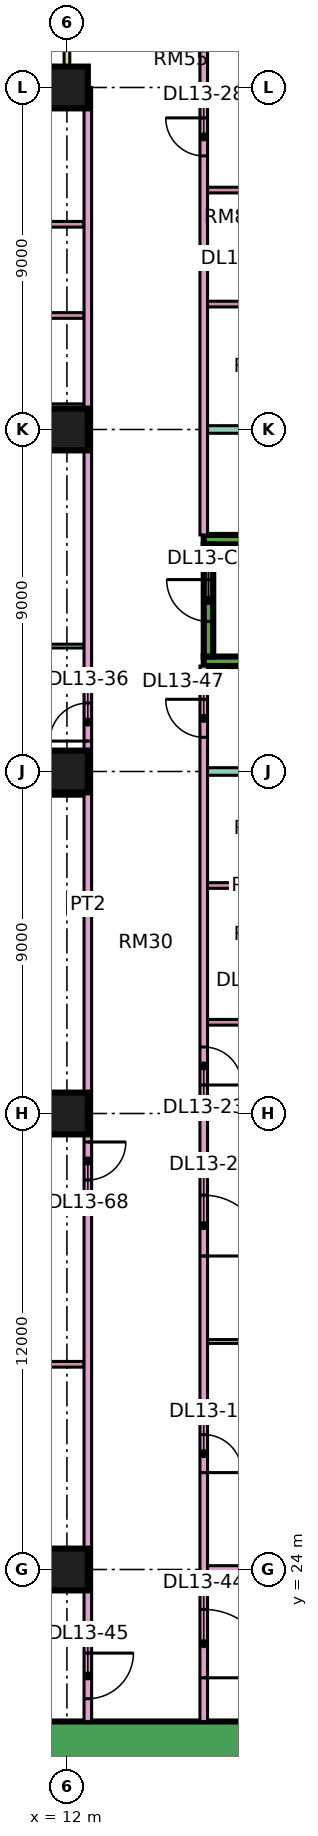
"""IFC4 building model, lengths in metres.
Left out: names, types, materials, properties, quantities, classifications, styles, units other than length and angle.
Written with IfcOpenShell. Run it as: python <this file> out.ifc"""

import sys

from ifc_helpers import new_model, si_unit, direction, frame, frame_2d, origin, origin_2d, place, context, subcontext, project, spatial, rectangle, extrude, element, fill, save


model = new_model("IFC4")
c1 = context("Model", 3, precision=1e-05, world=origin(), true_north=direction((0.0, 1.0)))
c2 = subcontext(c1, "Body", "Model", "MODEL_VIEW")
j1 = project(units=[si_unit("LENGTHUNIT", "METRE"), si_unit("PLANEANGLEUNIT", "RADIAN")], contexts=[c1])
p1 = place(None, origin())
s1 = spatial("IfcSite", under=j1, at=p1, CompositionType="ELEMENT")
p2 = place(p1, origin())
s2 = spatial("IfcBuilding", under=s1, at=p2, CompositionType="ELEMENT")
p3 = place(p2, frame((0.0, 0.0, 63.9)))
s3 = spatial("IfcBuildingStorey", under=s2, at=p3, CompositionType="ELEMENT", Elevation=63.9)
for number, where, z_axis, x_axis in (
    (1, (12.0, 24.0, 0.0), (0.0, 0.0, 1.0), (1.0, 0.0, 0.0)),
    (2, (12.0, 36.0, 0.0), (0.0, 0.0, 1.0), (1.0, 0.0, 0.0)),
    (3, (12.0, 45.0, 0.0), (0.0, 0.0, 1.0), (1.0, 0.0, 0.0)),
    (4, (12.0, 54.0, 0.0), (0.0, 0.0, 1.0), (1.0, 0.0, 0.0)),
    (5, (12.0, 63.0, 0.0), (0.0, 0.0, 1.0), (1.0, 0.0, 0.0)),
):
    element("IfcColumn", number, at=place(p3, frame(where, z_axis=z_axis, x_axis=x_axis)), inside=s3, PredefinedType="COLUMN", context=c2, shape_type="SweptSolid", body=[
        extrude(rectangle(XDim=1.1, YDim=1.1, at=origin_2d()), origin(), (0.0, 0.0, 1.0), 3.75),
    ])
p4 = place(p3, frame((9.0, 19.45, 0.0), z_axis=(0.0, 0.0, 1.0), x_axis=(1.0, 0.0, 0.0)))
e6 = element("IfcWall", 6, at=p4, inside=s3, PredefinedType="SHEAR", context=c2, shape_type="SweptSolid", body=[
    extrude(rectangle(XDim=25.0, YDim=1.1, at=frame_2d((12.5, 0.0))), origin(), (0.0, 0.0, 1.0), 3.75),
])
p5 = place(p4, frame((19.1, 0.0, 0.0)))
e7 = element("IfcOpeningElement", 7, at=p5, cuts=e6, PredefinedType="OPENING", context=c2, shape_type="SweptSolid", body=[
    extrude(rectangle(XDim=1.8, YDim=2.4, at=frame_2d((0.9, 1.2))), frame((0.0, 0.56, 0.0), z_axis=(0.0, -1.0, 0.0), x_axis=(1.0, 0.0, 0.0)), (0.0, 0.0, 1.0), 1.12),
])
for number, where, z_axis, x_axis in (
    (8, (15.6, 47.9, 0.0), (0.0, 0.0, 1.0), (1.0, 0.0, 0.0)),
    (9, (15.6, 51.1, 0.0), (0.0, 0.0, 1.0), (1.0, 0.0, 0.0)),
):
    element("IfcWall", number, at=place(p3, frame(where, z_axis=z_axis, x_axis=x_axis)), inside=s3, PredefinedType="SHEAR", context=c2, shape_type="SweptSolid", body=[
        extrude(rectangle(XDim=7.0, YDim=0.25, at=frame_2d((3.5, 0.0))), origin(), (0.0, 0.0, 1.0), 3.75),
    ])
p6 = place(p3, frame((15.725, 48.025, 0.0), z_axis=(0.0, 0.0, 1.0), x_axis=(0.0, 1.0, 0.0)))
e10 = element("IfcWall", 10, at=p6, inside=s3, PredefinedType="SHEAR", context=c2, shape_type="SweptSolid", body=[
    extrude(rectangle(XDim=2.95, YDim=0.25, at=frame_2d((1.475, 0.0))), origin(), (0.0, 0.0, 1.0), 3.75),
])
p7 = place(p6, frame((0.925, 0.0, 0.0)))
e11 = element("IfcOpeningElement", 11, at=p7, cuts=e10, PredefinedType="OPENING", context=c2, shape_type="SweptSolid", body=[
    extrude(rectangle(XDim=1.1, YDim=2.2, at=frame_2d((0.55, 1.1))), frame((0.0, 0.135, 0.0), z_axis=(0.0, -1.0, 0.0), x_axis=(1.0, 0.0, 0.0)), (0.0, 0.0, 1.0), 0.27),
])
p8 = place(p3, frame((11.925, 63.0, 0.0), z_axis=(0.0, 0.0, 1.0), x_axis=(-1.0, 0.0, 0.0)))
e12 = element("IfcWall", 12, at=p8, inside=s3, PredefinedType="SOLIDWALL", context=c2, shape_type="SweptSolid", body=[
    extrude(rectangle(XDim=10.35, YDim=0.15, at=frame_2d((5.175, 0.0))), origin(), (0.0, 0.0, 1.0), 3.35),
])
p9 = place(p8, frame((2.075, 0.0, 1.7)))
e13 = element("IfcOpeningElement", 13, at=p9, cuts=e12, PredefinedType="OPENING", context=c2, shape_type="SweptSolid", body=[
    extrude(rectangle(XDim=1.2, YDim=0.9, at=frame_2d((0.6, 0.45))), frame((0.0, 0.085, 0.0), z_axis=(0.0, -1.0, 0.0), x_axis=(1.0, 0.0, 0.0)), (0.0, 0.0, 1.0), 0.17),
])
p10 = place(p8, frame((7.262, 0.0, 0.0)))
e14 = element("IfcOpeningElement", 14, at=p10, cuts=e12, PredefinedType="OPENING", context=c2, shape_type="SweptSolid", body=[
    extrude(rectangle(XDim=1.8, YDim=2.4, at=frame_2d((0.9, 1.2))), frame((0.0, 0.085, 0.0), z_axis=(0.0, -1.0, 0.0), x_axis=(1.0, 0.0, 0.0)), (0.0, 0.0, 1.0), 0.17),
])
p11 = place(p3, frame((12.0, 64.5, 0.0), z_axis=(0.0, 0.0, 1.0), x_axis=(0.0, -1.0, 0.0)))
e15 = element("IfcWall", 15, at=p11, inside=s3, PredefinedType="SOLIDWALL", context=c2, shape_type="SweptSolid", body=[
    extrude(rectangle(XDim=1.5, YDim=0.15, at=frame_2d((0.75, 0.0))), origin(), (0.0, 0.0, 1.0), 3.35),
])
p12 = place(p3, frame((-1.35, 22.4, 0.0), z_axis=(0.0, 0.0, 1.0), x_axis=(1.0, 0.0, 0.0)))
e16 = element("IfcWall", 16, at=p12, inside=s3, PredefinedType="PARTITIONING", context=c2, shape_type="SweptSolid", body=[
    extrude(rectangle(XDim=13.8, YDim=0.2, at=frame_2d((6.9, 0.0))), origin(), (0.0, 0.0, 1.0), 3.35),
])
p13 = place(p3, frame((0.0, 36.0, 0.0), z_axis=(0.0, 0.0, 1.0), x_axis=(1.0, 0.0, 0.0)))
e17 = element("IfcWall", 17, at=p13, inside=s3, PredefinedType="PARTITIONING", context=c2, shape_type="SweptSolid", body=[
    extrude(rectangle(XDim=12.45, YDim=0.2, at=frame_2d((6.225, 0.0))), origin(), (0.0, 0.0, 1.0), 3.35),
])
p14 = place(p3, frame((7.2, 44.4, 0.0), z_axis=(0.0, 0.0, 1.0), x_axis=(1.0, 0.0, 0.0)))
e18 = element("IfcWall", 18, at=p14, inside=s3, PredefinedType="PARTITIONING", context=c2, shape_type="SweptSolid", body=[
    extrude(rectangle(XDim=5.25, YDim=0.1, at=frame_2d((2.625, 0.0))), origin(), (0.0, 0.0, 1.0), 3.35),
])
p15 = place(p3, frame((7.225, 29.4, 0.0), z_axis=(0.0, 0.0, 1.0), x_axis=(1.0, 0.0, 0.0)))
e19 = element("IfcWall", 19, at=p15, inside=s3, PredefinedType="PARTITIONING", context=c2, shape_type="SweptSolid", body=[
    extrude(rectangle(XDim=5.225, YDim=0.15, at=frame_2d((2.612, 0.0))), origin(), (0.0, 0.0, 1.0), 3.35),
])
p16 = place(p3, frame((7.225, 33.6, 0.0), z_axis=(0.0, 0.0, 1.0), x_axis=(1.0, 0.0, 0.0)))
e20 = element("IfcWall", 20, at=p16, inside=s3, PredefinedType="PARTITIONING", context=c2, shape_type="SweptSolid", body=[
    extrude(rectangle(XDim=5.225, YDim=0.15, at=frame_2d((2.612, 0.0))), origin(), (0.0, 0.0, 1.0), 3.35),
])
p17 = place(p16, frame((2.175, 0.0, 0.0)))
e21 = element("IfcOpeningElement", 21, at=p17, cuts=e20, PredefinedType="OPENING", context=c2, shape_type="SweptSolid", body=[
    extrude(rectangle(XDim=0.8, YDim=2.1, at=frame_2d((0.4, 1.05))), frame((0.0, 0.085, 0.0), z_axis=(0.0, -1.0, 0.0), x_axis=(1.0, 0.0, 0.0)), (0.0, 0.0, 1.0), 0.17),
])
p18 = place(p3, frame((7.225, 48.3, 0.0), z_axis=(0.0, 0.0, 1.0), x_axis=(1.0, 0.0, 0.0)))
e22 = element("IfcWall", 22, at=p18, inside=s3, PredefinedType="PARTITIONING", context=c2, shape_type="SweptSolid", body=[
    extrude(rectangle(XDim=5.225, YDim=0.1, at=frame_2d((2.612, 0.0))), origin(), (0.0, 0.0, 1.0), 3.35),
])
p19 = place(p18, frame((2.175, 0.0, 0.0)))
e23 = element("IfcOpeningElement", 23, at=p19, cuts=e22, PredefinedType="OPENING", context=c2, shape_type="SweptSolid", body=[
    extrude(rectangle(XDim=0.9, YDim=2.1, at=frame_2d((0.45, 1.05))), frame((0.0, 0.06, 0.0), z_axis=(0.0, -1.0, 0.0), x_axis=(1.0, 0.0, 0.0)), (0.0, 0.0, 1.0), 0.12),
])
for number, where, z_axis, x_axis in (
    (24, (7.225, 54.6, 0.0), (0.0, 0.0, 1.0), (1.0, 0.0, 0.0)),
    (25, (7.225, 57.0, 0.0), (0.0, 0.0, 1.0), (1.0, 0.0, 0.0)),
    (26, (7.225, 59.4, 0.0), (0.0, 0.0, 1.0), (1.0, 0.0, 0.0)),
):
    element("IfcWall", number, at=place(p3, frame(where, z_axis=z_axis, x_axis=x_axis)), inside=s3, PredefinedType="PARTITIONING", context=c2, shape_type="SweptSolid", body=[
        extrude(rectangle(XDim=5.225, YDim=0.15, at=frame_2d((2.612, 0.0))), origin(), (0.0, 0.0, 1.0), 3.35),
    ])
p20 = place(p3, frame((12.55, 20.0, 0.0), z_axis=(0.0, 0.0, 1.0), x_axis=(0.0, 1.0, 0.0)))
e27 = element("IfcWall", 27, at=p20, inside=s3, PredefinedType="PARTITIONING", context=c2, shape_type="SweptSolid", body=[
    extrude(rectangle(XDim=43.0, YDim=0.2, at=frame_2d((21.5, 0.0))), origin(), (0.0, 0.0, 1.0), 3.35),
])
p21 = place(p20, frame((25.8, 0.0, 0.0)))
e28 = element("IfcOpeningElement", 28, at=p21, cuts=e27, PredefinedType="OPENING", context=c2, shape_type="SweptSolid", body=[
    extrude(rectangle(XDim=1.0, YDim=2.1, at=frame_2d((0.5, 1.05))), frame((0.0, 0.11, 0.0), z_axis=(0.0, -1.0, 0.0), x_axis=(1.0, 0.0, 0.0)), (0.0, 0.0, 1.0), 0.22),
])
p22 = place(p20, frame((0.6, 0.0, 0.0)))
e29 = element("IfcOpeningElement", 29, at=p22, cuts=e27, PredefinedType="OPENING", context=c2, shape_type="SweptSolid", body=[
    extrude(rectangle(XDim=1.2, YDim=2.1, at=frame_2d((0.6, 1.05))), frame((0.0, 0.11, 0.0), z_axis=(0.0, -1.0, 0.0), x_axis=(1.0, 0.0, 0.0)), (0.0, 0.0, 1.0), 0.22),
])
p23 = place(p20, frame((14.25, 0.0, 0.0)))
e30 = element("IfcOpeningElement", 30, at=p23, cuts=e27, PredefinedType="OPENING", context=c2, shape_type="SweptSolid", body=[
    extrude(rectangle(XDim=1.0, YDim=2.1, at=frame_2d((0.5, 1.05))), frame((0.0, 0.11, 0.0), z_axis=(0.0, -1.0, 0.0), x_axis=(1.0, 0.0, 0.0)), (0.0, 0.0, 1.0), 0.22),
])
p24 = place(p3, frame((15.6, 20.0, 0.0), z_axis=(0.0, 0.0, 1.0), x_axis=(0.0, 1.0, 0.0)))
e31 = element("IfcWall", 31, at=p24, inside=s3, PredefinedType="PARTITIONING", context=c2, shape_type="SweptSolid", body=[
    extrude(rectangle(XDim=27.775, YDim=0.2, at=frame_2d((13.887, 0.0))), origin(), (0.0, 0.0, 1.0), 3.35),
])
p25 = place(p24, frame((6.55, 0.0, 0.0)))
e32 = element("IfcOpeningElement", 32, at=p25, cuts=e31, PredefinedType="OPENING", context=c2, shape_type="SweptSolid", body=[
    extrude(rectangle(XDim=1.0, YDim=2.1, at=frame_2d((0.5, 1.05))), frame((0.0, 0.11, 0.0), z_axis=(0.0, -1.0, 0.0), x_axis=(1.0, 0.0, 0.0)), (0.0, 0.0, 1.0), 0.22),
])
p26 = place(p24, frame((12.25, 0.0, 0.0)))
e33 = element("IfcOpeningElement", 33, at=p26, cuts=e31, PredefinedType="OPENING", context=c2, shape_type="SweptSolid", body=[
    extrude(rectangle(XDim=1.6, YDim=2.1, at=frame_2d((0.8, 1.05))), frame((0.0, 0.11, 0.0), z_axis=(0.0, -1.0, 0.0), x_axis=(1.0, 0.0, 0.0)), (0.0, 0.0, 1.0), 0.22),
])
p27 = place(p24, frame((16.75, 0.0, 0.0)))
e34 = element("IfcOpeningElement", 34, at=p27, cuts=e31, PredefinedType="OPENING", context=c2, shape_type="SweptSolid", body=[
    extrude(rectangle(XDim=1.0, YDim=2.1, at=frame_2d((0.5, 1.05))), frame((0.0, 0.11, 0.0), z_axis=(0.0, -1.0, 0.0), x_axis=(1.0, 0.0, 0.0)), (0.0, 0.0, 1.0), 0.22),
])
p28 = place(p24, frame((1.15, 0.0, 0.0)))
e35 = element("IfcOpeningElement", 35, at=p28, cuts=e31, PredefinedType="OPENING", context=c2, shape_type="SweptSolid", body=[
    extrude(rectangle(XDim=1.8, YDim=2.1, at=frame_2d((0.9, 1.05))), frame((0.0, 0.11, 0.0), z_axis=(0.0, -1.0, 0.0), x_axis=(1.0, 0.0, 0.0)), (0.0, 0.0, 1.0), 0.22),
])
p29 = place(p24, frame((25.9, 0.0, 0.0)))
e36 = element("IfcOpeningElement", 36, at=p29, cuts=e31, PredefinedType="OPENING", context=c2, shape_type="SweptSolid", body=[
    extrude(rectangle(XDim=1.0, YDim=2.1, at=frame_2d((0.5, 1.05))), frame((0.0, 0.11, 0.0), z_axis=(0.0, -1.0, 0.0), x_axis=(1.0, 0.0, 0.0)), (0.0, 0.0, 1.0), 0.22),
])
p30 = place(p3, frame((15.6, 51.225, 0.0), z_axis=(0.0, 0.0, 1.0), x_axis=(0.0, 1.0, 0.0)))
e37 = element("IfcWall", 37, at=p30, inside=s3, PredefinedType="PARTITIONING", context=c2, shape_type="SweptSolid", body=[
    extrude(rectangle(XDim=13.125, YDim=0.2, at=frame_2d((6.562, 0.0))), origin(), (0.0, 0.0, 1.0), 3.35),
])
p31 = place(p30, frame((9.975, 0.0, 0.0)))
e38 = element("IfcOpeningElement", 38, at=p31, cuts=e37, PredefinedType="OPENING", context=c2, shape_type="SweptSolid", body=[
    extrude(rectangle(XDim=1.0, YDim=2.1, at=frame_2d((0.5, 1.05))), frame((0.0, 0.11, 0.0), z_axis=(0.0, -1.0, 0.0), x_axis=(1.0, 0.0, 0.0)), (0.0, 0.0, 1.0), 0.22),
])
p32 = place(p3, frame((15.7, 24.0, 0.0), z_axis=(0.0, 0.0, 1.0), x_axis=(1.0, 0.0, 0.0)))
e39 = element("IfcWall", 39, at=p32, inside=s3, PredefinedType="PARTITIONING", context=c2, shape_type="SweptSolid", body=[
    extrude(rectangle(XDim=5.8, YDim=0.2, at=frame_2d((2.9, 0.0))), origin(), (0.0, 0.0, 1.0), 3.35),
])
p33 = place(p3, frame((15.7, 30.0, 0.0), z_axis=(0.0, 0.0, 1.0), x_axis=(1.0, 0.0, 0.0)))
e40 = element("IfcWall", 40, at=p33, inside=s3, PredefinedType="PARTITIONING", context=c2, shape_type="SweptSolid", body=[
    extrude(rectangle(XDim=5.8, YDim=0.1, at=frame_2d((2.9, 0.0))), origin(), (0.0, 0.0, 1.0), 3.35),
])
p34 = place(p3, frame((15.7, 36.0, 0.0), z_axis=(0.0, 0.0, 1.0), x_axis=(1.0, 0.0, 0.0)))
e41 = element("IfcWall", 41, at=p34, inside=s3, PredefinedType="PARTITIONING", context=c2, shape_type="SweptSolid", body=[
    extrude(rectangle(XDim=8.3, YDim=0.2, at=frame_2d((4.15, 0.0))), origin(), (0.0, 0.0, 1.0), 3.35),
])
p35 = place(p3, frame((15.7, 38.4, 0.0), z_axis=(0.0, 0.0, 1.0), x_axis=(1.0, 0.0, 0.0)))
e42 = element("IfcWall", 42, at=p35, inside=s3, PredefinedType="PARTITIONING", context=c2, shape_type="SweptSolid", body=[
    extrude(rectangle(XDim=2.525, YDim=0.15, at=frame_2d((1.263, 0.0))), origin(), (0.0, 0.0, 1.0), 3.35),
])
p36 = place(p35, frame((0.9, 0.0, 0.0)))
e43 = element("IfcOpeningElement", 43, at=p36, cuts=e42, PredefinedType="OPENING", context=c2, shape_type="SweptSolid", body=[
    extrude(rectangle(XDim=0.8, YDim=2.1, at=frame_2d((0.4, 1.05))), frame((0.0, 0.085, 0.0), z_axis=(0.0, -1.0, 0.0), x_axis=(1.0, 0.0, 0.0)), (0.0, 0.0, 1.0), 0.17),
])
p37 = place(p3, frame((15.7, 42.0, 0.0), z_axis=(0.0, 0.0, 1.0), x_axis=(1.0, 0.0, 0.0)))
e44 = element("IfcWall", 44, at=p37, inside=s3, PredefinedType="PARTITIONING", context=c2, shape_type="SweptSolid", body=[
    extrude(rectangle(XDim=2.525, YDim=0.15, at=frame_2d((1.263, 0.0))), origin(), (0.0, 0.0, 1.0), 3.35),
])
p38 = place(p3, frame((15.7, 45.0, 0.0), z_axis=(0.0, 0.0, 1.0), x_axis=(1.0, 0.0, 0.0)))
e45 = element("IfcWall", 45, at=p38, inside=s3, PredefinedType="PARTITIONING", context=c2, shape_type="SweptSolid", body=[
    extrude(rectangle(XDim=8.3, YDim=0.2, at=frame_2d((4.15, 0.0))), origin(), (0.0, 0.0, 1.0), 3.35),
])
p39 = place(p3, frame((15.7, 54.0, 0.0), z_axis=(0.0, 0.0, 1.0), x_axis=(1.0, 0.0, 0.0)))
e46 = element("IfcWall", 46, at=p39, inside=s3, PredefinedType="PARTITIONING", context=c2, shape_type="SweptSolid", body=[
    extrude(rectangle(XDim=8.226, YDim=0.2, at=frame_2d((4.113, 0.0))), origin(), (0.0, 0.0, 1.0), 3.35),
])
for number, where, z_axis, x_axis in (
    (47, (15.7, 57.3, 0.0), (0.0, 0.0, 1.0), (1.0, 0.0, 0.0)),
    (48, (15.7, 60.3, 0.0), (0.0, 0.0, 1.0), (1.0, 0.0, 0.0)),
):
    element("IfcWall", number, at=place(p3, frame(where, z_axis=z_axis, x_axis=x_axis)), inside=s3, PredefinedType="PARTITIONING", context=c2, shape_type="SweptSolid", body=[
        extrude(rectangle(XDim=2.525, YDim=0.15, at=frame_2d((1.263, 0.0))), origin(), (0.0, 0.0, 1.0), 3.35),
    ])
p40 = place(p7, frame((1.1, 0.0, 0.0), z_axis=(0.0, 0.0, 1.0), x_axis=(-1.0, 0.0, 0.0)))
e49 = element("IfcDoor", 49, at=p40, inside=s3, OperationType="SINGLE_SWING_RIGHT", PredefinedType="DOOR", context=c2, shape_type="SweptSolid", body=[
    extrude(rectangle(XDim=1.1, YDim=2.2, at=frame_2d((0.55, 1.1))), frame((0.0, 0.025, 0.0), z_axis=(0.0, -1.0, 0.0), x_axis=(1.0, 0.0, 0.0)), (0.0, 0.0, 1.0), 0.05),
])
fill(e11, e49)
p41 = place(p25, frame((1.0, 0.0, 0.0), z_axis=(0.0, 0.0, 1.0), x_axis=(-1.0, 0.0, 0.0)))
e50 = element("IfcDoor", 50, at=p41, inside=s3, OperationType="SINGLE_SWING_LEFT", PredefinedType="DOOR", context=c2, shape_type="SweptSolid", body=[
    extrude(rectangle(XDim=1.0, YDim=2.1, at=frame_2d((0.5, 1.05))), frame((0.0, 0.025, 0.0), z_axis=(0.0, -1.0, 0.0), x_axis=(1.0, 0.0, 0.0)), (0.0, 0.0, 1.0), 0.05),
])
fill(e32, e50)
p42 = place(p26, frame((1.6, 0.0, 0.0), z_axis=(0.0, 0.0, 1.0), x_axis=(-1.0, 0.0, 0.0)))
e51 = element("IfcDoor", 51, at=p42, inside=s3, OperationType="DOUBLE_DOOR_SINGLE_SWING", PredefinedType="DOOR", context=c2, shape_type="SweptSolid", body=[
    extrude(rectangle(XDim=1.6, YDim=2.1, at=frame_2d((0.8, 1.05))), frame((0.0, 0.025, 0.0), z_axis=(0.0, -1.0, 0.0), x_axis=(1.0, 0.0, 0.0)), (0.0, 0.0, 1.0), 0.05),
])
fill(e33, e51)
p43 = place(p27, frame((1.0, 0.0, 0.0), z_axis=(0.0, 0.0, 1.0), x_axis=(-1.0, 0.0, 0.0)))
e52 = element("IfcDoor", 52, at=p43, inside=s3, OperationType="SINGLE_SWING_LEFT", PredefinedType="DOOR", context=c2, shape_type="SweptSolid", body=[
    extrude(rectangle(XDim=1.0, YDim=2.1, at=frame_2d((0.5, 1.05))), frame((0.0, 0.025, 0.0), z_axis=(0.0, -1.0, 0.0), x_axis=(1.0, 0.0, 0.0)), (0.0, 0.0, 1.0), 0.05),
])
fill(e34, e52)
p44 = place(p31, frame((1.0, 0.0, 0.0), z_axis=(0.0, 0.0, 1.0), x_axis=(-1.0, 0.0, 0.0)))
e53 = element("IfcDoor", 53, at=p44, inside=s3, OperationType="SINGLE_SWING_RIGHT", PredefinedType="DOOR", context=c2, shape_type="SweptSolid", body=[
    extrude(rectangle(XDim=1.0, YDim=2.1, at=frame_2d((0.5, 1.05))), frame((0.0, 0.025, 0.0), z_axis=(0.0, -1.0, 0.0), x_axis=(1.0, 0.0, 0.0)), (0.0, 0.0, 1.0), 0.05),
])
fill(e38, e53)
p45 = place(p21, origin())
e54 = element("IfcDoor", 54, at=p45, inside=s3, OperationType="SINGLE_SWING_LEFT", PredefinedType="DOOR", context=c2, shape_type="SweptSolid", body=[
    extrude(rectangle(XDim=1.0, YDim=2.1, at=frame_2d((0.5, 1.05))), frame((0.0, 0.025, 0.0), z_axis=(0.0, -1.0, 0.0), x_axis=(1.0, 0.0, 0.0)), (0.0, 0.0, 1.0), 0.05),
])
fill(e28, e54)
p46 = place(p28, frame((1.8, 0.0, 0.0), z_axis=(0.0, 0.0, 1.0), x_axis=(-1.0, 0.0, 0.0)))
e55 = element("IfcDoor", 55, at=p46, inside=s3, OperationType="DOUBLE_DOOR_SINGLE_SWING", PredefinedType="DOOR", context=c2, shape_type="SweptSolid", body=[
    extrude(rectangle(XDim=1.8, YDim=2.1, at=frame_2d((0.9, 1.05))), frame((0.0, 0.025, 0.0), z_axis=(0.0, -1.0, 0.0), x_axis=(1.0, 0.0, 0.0)), (0.0, 0.0, 1.0), 0.05),
])
fill(e35, e55)
p47 = place(p22, origin())
e56 = element("IfcDoor", 56, at=p47, inside=s3, OperationType="SINGLE_SWING_RIGHT", PredefinedType="DOOR", context=c2, shape_type="SweptSolid", body=[
    extrude(rectangle(XDim=1.2, YDim=2.1, at=frame_2d((0.6, 1.05))), frame((0.0, 0.025, 0.0), z_axis=(0.0, -1.0, 0.0), x_axis=(1.0, 0.0, 0.0)), (0.0, 0.0, 1.0), 0.05),
])
fill(e29, e56)
p48 = place(p29, frame((1.0, 0.0, 0.0), z_axis=(0.0, 0.0, 1.0), x_axis=(-1.0, 0.0, 0.0)))
e57 = element("IfcDoor", 57, at=p48, inside=s3, OperationType="SINGLE_SWING_RIGHT", PredefinedType="DOOR", context=c2, shape_type="SweptSolid", body=[
    extrude(rectangle(XDim=1.0, YDim=2.1, at=frame_2d((0.5, 1.05))), frame((0.0, 0.025, 0.0), z_axis=(0.0, -1.0, 0.0), x_axis=(1.0, 0.0, 0.0)), (0.0, 0.0, 1.0), 0.05),
])
fill(e36, e57)
p49 = place(p23, origin())
e58 = element("IfcDoor", 58, at=p49, inside=s3, OperationType="SINGLE_SWING_RIGHT", PredefinedType="DOOR", context=c2, shape_type="SweptSolid", body=[
    extrude(rectangle(XDim=1.0, YDim=2.1, at=frame_2d((0.5, 1.05))), frame((0.0, 0.025, 0.0), z_axis=(0.0, -1.0, 0.0), x_axis=(1.0, 0.0, 0.0)), (0.0, 0.0, 1.0), 0.05),
])
fill(e30, e58)
save(model, sys.argv[1])
